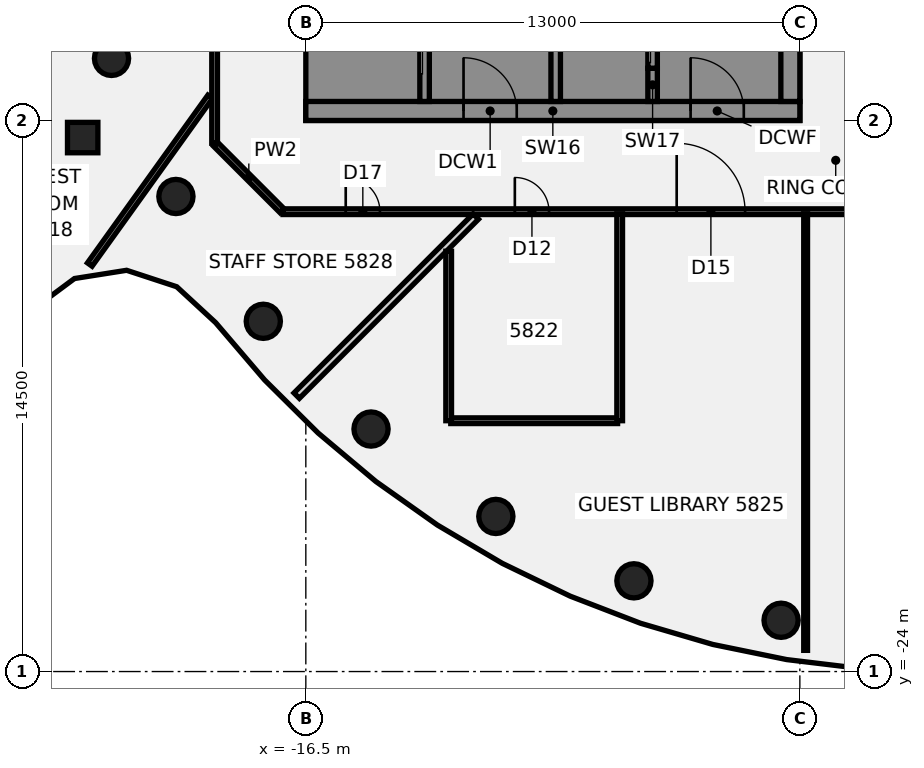
"""IFC4 building model, lengths in metres.
Left out: names, types, materials, properties, quantities, classifications, styles, units other than length and angle.
Written with IfcOpenShell. Run it as: python <this file> out.ifc"""

import sys

from ifc_helpers import new_model, si_unit, direction, frame, frame_2d, origin, origin_2d, place, context, subcontext, project, spatial, polyline, rectangle, circle, outline, extrude, element, fill, save


model = new_model("IFC4")
c1 = context("Model", 3, precision=1e-05, world=origin(), true_north=direction((0.0, 1.0)))
c2 = subcontext(c1, "Body", "Model", "MODEL_VIEW")
j1 = project(units=[si_unit("LENGTHUNIT", "METRE"), si_unit("PLANEANGLEUNIT", "RADIAN")], contexts=[c1])
p1 = place(None, origin())
s1 = spatial("IfcSite", under=j1, at=p1, CompositionType="ELEMENT")
p2 = place(p1, origin())
s2 = spatial("IfcBuilding", under=s1, at=p2, CompositionType="ELEMENT")
p3 = place(p2, frame((0.0, 0.0, 230.7)))
s3 = spatial("IfcBuildingStorey", under=s2, at=p3, CompositionType="ELEMENT", Elevation=230.7)
for number, where, z_axis, x_axis in (
    (1, (-21.613, -7.866, -0.14), (0.0, 0.0, 1.0), (1.0, 0.0, 0.0)),
    (2, (-19.919, -11.5, -0.14), (0.0, 0.0, 1.0), (1.0, 0.0, 0.0)),
    (3, (-17.619, -14.784, -0.14), (0.0, 0.0, 1.0), (1.0, 0.0, 0.0)),
    (4, (-14.784, -17.619, -0.14), (0.0, 0.0, 1.0), (1.0, 0.0, 0.0)),
    (5, (-11.5, -19.919, -0.14), (0.0, 0.0, 1.0), (1.0, 0.0, 0.0)),
    (6, (-7.866, -21.613, -0.14), (0.0, 0.0, 1.0), (1.0, 0.0, 0.0)),
    (7, (-3.994, -22.651, -0.14), (0.0, 0.0, 1.0), (1.0, 0.0, 0.0)),
):
    element("IfcColumn", number, at=place(p3, frame(where, z_axis=z_axis, x_axis=x_axis)), inside=s3, PredefinedType="COLUMN", context=c2, shape_type="SweptSolid", body=[
        extrude(circle(Radius=0.45, at=origin_2d()), origin(), (0.0, 0.0, 1.0), 3.6),
    ])
p4 = place(p3, frame((-22.372, -9.95, -0.139), z_axis=(0.050360127001, -0.001423368327, 0.998730109505), x_axis=(-0.811318568175, 0.583112220607, 0.041741096219)))
e8 = element("IfcColumn", 8, at=p4, inside=s3, PredefinedType="COLUMN", context=c2, shape_type="SweptSolid", body=[
    extrude(rectangle(XDim=0.8, YDim=0.8, at=origin_2d()), origin(), (0.0, 0.0, 1.0), 3.602),
])
p5 = place(p3, frame((-18.872, -10.128, 0.0), z_axis=(0.0, 0.0, 1.0), x_axis=(0.707106781187, -0.707106781187, 0.0)))
e9 = element("IfcWall", 9, at=p5, inside=s3, PredefinedType="PARTITIONING", context=c2, shape_type="SweptSolid", body=[
    extrude(rectangle(XDim=2.465, YDim=0.15, at=frame_2d((1.232, 0.0))), origin(), (0.0, 0.0, 1.0), 2.864),
])
p6 = place(p3, frame((-17.1, -11.9, 0.0), z_axis=(0.0, 0.0, 1.0), x_axis=(1.0, 0.0, 0.0)))
e10 = element("IfcWall", 10, at=p6, inside=s3, PredefinedType="PARTITIONING", context=c2, shape_type="SweptSolid", body=[
    extrude(rectangle(XDim=34.165, YDim=0.15, at=frame_2d((17.083, 0.0))), origin(), (0.0, 0.0, 1.0), 2.864),
])
p7 = place(p6, frame((6.1, 0.0, 0.0)))
e11 = element("IfcOpeningElement", 11, at=p7, cuts=e10, PredefinedType="OPENING", context=c2, shape_type="SweptSolid", body=[
    extrude(rectangle(XDim=0.9, YDim=2.1, at=frame_2d((0.45, 1.05))), frame((0.0, 0.085, 0.0), z_axis=(0.0, -1.0, 0.0), x_axis=(1.0, 0.0, 0.0)), (0.0, 0.0, 1.0), 0.17),
])
p8 = place(p6, frame((27.541, 0.0, 0.0)))
e12 = element("IfcOpeningElement", 12, at=p8, cuts=e10, PredefinedType="OPENING", context=c2, shape_type="SweptSolid", body=[
    extrude(rectangle(XDim=0.9, YDim=2.1, at=frame_2d((0.45, 1.05))), frame((0.0, 0.085, 0.0), z_axis=(0.0, -1.0, 0.0), x_axis=(1.0, 0.0, 0.0)), (0.0, 0.0, 1.0), 0.17),
])
p9 = place(p6, frame((19.152, 0.0, 0.0)))
e13 = element("IfcOpeningElement", 13, at=p9, cuts=e10, PredefinedType="OPENING", context=c2, shape_type="SweptSolid", body=[
    extrude(rectangle(XDim=1.8, YDim=2.1, at=frame_2d((0.9, 1.05))), frame((0.0, 0.085, 0.0), z_axis=(0.0, -1.0, 0.0), x_axis=(1.0, 0.0, 0.0)), (0.0, 0.0, 1.0), 0.17),
])
p10 = place(p6, frame((10.359, 0.0, 0.0)))
e14 = element("IfcOpeningElement", 14, at=p10, cuts=e10, PredefinedType="OPENING", context=c2, shape_type="SweptSolid", body=[
    extrude(rectangle(XDim=1.8, YDim=2.1, at=frame_2d((0.9, 1.05))), frame((0.0, 0.085, 0.0), z_axis=(0.0, -1.0, 0.0), x_axis=(1.0, 0.0, 0.0)), (0.0, 0.0, 1.0), 0.17),
])
p11 = place(p6, frame((30.5, 0.0, 0.0)))
e15 = element("IfcOpeningElement", 15, at=p11, cuts=e10, PredefinedType="OPENING", context=c2, shape_type="SweptSolid", body=[
    extrude(rectangle(XDim=0.9, YDim=2.1, at=frame_2d((0.45, 1.05))), frame((0.0, 0.085, 0.0), z_axis=(0.0, -1.0, 0.0), x_axis=(1.0, 0.0, 0.0)), (0.0, 0.0, 1.0), 0.17),
])
p12 = place(p6, frame((1.65, 0.0, 0.0)))
e16 = element("IfcOpeningElement", 16, at=p12, cuts=e10, PredefinedType="OPENING", context=c2, shape_type="SweptSolid", body=[
    extrude(rectangle(XDim=0.9, YDim=2.1, at=frame_2d((0.45, 1.05))), frame((0.0, 0.085, 0.0), z_axis=(0.0, -1.0, 0.0), x_axis=(1.0, 0.0, 0.0)), (0.0, 0.0, 1.0), 0.17),
])
p13 = place(p3, frame((-12.686, -17.4, 0.0), z_axis=(0.0, 0.0, 1.0), x_axis=(1.0, 0.0, 0.0)))
e17 = element("IfcWall", 17, at=p13, inside=s3, PredefinedType="PARTITIONING", context=c2, shape_type="SweptSolid", body=[
    extrude(rectangle(XDim=4.39, YDim=0.15, at=frame_2d((2.195, 0.0))), origin(), (0.0, 0.0, 1.0), 2.864),
])
p14 = place(p3, frame((-16.74, -16.74, 0.0), z_axis=(0.0, 0.0, 1.0), x_axis=(0.707106781187, 0.707106781187, 0.0)))
e18 = element("IfcWall", 18, at=p14, inside=s3, PredefinedType="PARTITIONING", context=c2, shape_type="SweptSolid", body=[
    extrude(rectangle(XDim=6.665, YDim=0.2, at=frame_2d((3.333, 0.0))), origin(), (0.0, 0.0, 1.0), 2.864),
])
p15 = place(p3, frame((-22.185, -13.291, 0.0), z_axis=(0.0, 0.0, 1.0), x_axis=(0.583119360329, 0.812386491523, 0.0)))
e19 = element("IfcWall", 19, at=p15, inside=s3, PredefinedType="PARTITIONING", context=c2, shape_type="SweptSolid", body=[
    extrude(rectangle(XDim=5.434, YDim=0.15, at=frame_2d((2.717, 0.0))), origin(), (0.0, 0.0, 1.0), 2.864),
])
p16 = place(p3, frame((-18.9, -10.1, 0.0), z_axis=(0.0, 0.0, 1.0), x_axis=(0.0, 1.0, 0.0)))
e20 = element("IfcWall", 20, at=p16, inside=s3, PredefinedType="PARTITIONING", context=c2, shape_type="SweptSolid", body=[
    extrude(rectangle(XDim=20.2, YDim=0.15, at=frame_2d((10.1, 0.0))), origin(), (0.0, 0.0, 1.0), 2.864),
])
p17 = place(p16, frame((13.775, 0.0, 0.0)))
e21 = element("IfcOpeningElement", 21, at=p17, cuts=e20, PredefinedType="OPENING", context=c2, shape_type="SweptSolid", body=[
    extrude(rectangle(XDim=1.8, YDim=2.1, at=frame_2d((0.9, 1.05))), frame((0.0, 0.085, 0.0), z_axis=(0.0, -1.0, 0.0), x_axis=(1.0, 0.0, 0.0)), (0.0, 0.0, 1.0), 0.17),
])
p18 = place(p16, frame((5.597, 0.0, 0.0)))
e22 = element("IfcOpeningElement", 22, at=p18, cuts=e20, PredefinedType="OPENING", context=c2, shape_type="SweptSolid", body=[
    extrude(rectangle(XDim=1.8, YDim=2.1, at=frame_2d((0.9, 1.05))), frame((0.0, 0.085, 0.0), z_axis=(0.0, -1.0, 0.0), x_axis=(1.0, 0.0, 0.0)), (0.0, 0.0, 1.0), 0.17),
])
p19 = place(p3, frame((-12.741, -17.4, 0.0), z_axis=(0.0, 0.0, 1.0), x_axis=(0.0, 1.0, 0.0)))
e23 = element("IfcWall", 23, at=p19, inside=s3, PredefinedType="PARTITIONING", context=c2, shape_type="SweptSolid", body=[
    extrude(rectangle(XDim=4.459, YDim=0.15, at=frame_2d((2.229, 0.0))), origin(), (0.0, 0.0, 1.0), 2.864),
])
p20 = place(p3, frame((-8.241, -17.4, 0.0), z_axis=(0.0, 0.0, 1.0), x_axis=(0.0, 1.0, 0.0)))
e24 = element("IfcWall", 24, at=p20, inside=s3, PredefinedType="PARTITIONING", context=c2, shape_type="SweptSolid", body=[
    extrude(rectangle(XDim=5.445, YDim=0.15, at=frame_2d((2.722, 0.0))), origin(), (0.0, 0.0, 1.0), 2.864),
])
p21 = place(p3, frame((-3.348, -23.442, 0.0), z_axis=(0.0, 0.0, 1.0), x_axis=(0.0, 1.0, 0.0)))
e25 = element("IfcWall", 25, at=p21, inside=s3, PredefinedType="PARTITIONING", context=c2, shape_type="SweptSolid", body=[
    extrude(rectangle(XDim=11.487, YDim=0.1, at=frame_2d((5.744, 0.0))), origin(), (0.0, 0.0, 1.0), 2.864),
])
p22 = place(p3, frame((-16.5, -9.25, 0.0), z_axis=(0.0, 0.0, 1.0), x_axis=(1.0, 0.0, 0.0)))
e26 = element("IfcWall", 26, at=p22, inside=s3, PredefinedType="SHEAR", context=c2, shape_type="SweptSolid", body=[
    extrude(rectangle(XDim=13.0, YDim=0.5, at=frame_2d((6.5, 0.0))), origin(), (0.0, 0.0, 1.0), 3.46),
])
p23 = place(p22, frame((4.15, 0.0, 0.0)))
e27 = element("IfcOpeningElement", 27, at=p23, cuts=e26, PredefinedType="OPENING", context=c2, shape_type="SweptSolid", body=[
    extrude(rectangle(XDim=1.4, YDim=2.1, at=frame_2d((0.7, 1.05))), frame((0.0, 0.26, 0.0), z_axis=(0.0, -1.0, 0.0), x_axis=(1.0, 0.0, 0.0)), (0.0, 0.0, 1.0), 0.52),
])
p24 = place(p22, frame((10.125, 0.0, 0.0)))
e28 = element("IfcOpeningElement", 28, at=p24, cuts=e26, PredefinedType="OPENING", context=c2, shape_type="SweptSolid", body=[
    extrude(rectangle(XDim=1.4, YDim=2.1, at=frame_2d((0.7, 1.05))), frame((0.0, 0.26, 0.0), z_axis=(0.0, -1.0, 0.0), x_axis=(1.0, 0.0, 0.0)), (0.0, 0.0, 1.0), 0.52),
])
p25 = place(p3, origin())
e29 = element("IfcWall", 29, at=p25, inside=s3, PredefinedType="SHEAR", context=c2, shape_type="SweptSolid", body=[
    extrude(outline(polyline([(-13.5, -8.125), (-16.0, -8.125), (-16.0, -5.625), (-13.5, -5.625), (-13.5, -5.375), (-16.0, -5.375), (-16.0, 5.375), (-13.5, 5.375), (-13.5, 5.625), (-16.0, 5.625), (-16.0, 8.125), (-13.5, 8.125), (-13.5, 9.0), (-16.0, 9.0), (-16.5, 9.0), (-16.5, -9.0), (-16.0, -9.0), (-13.5, -9.0), (-13.5, -8.125)])), origin(), (0.0, 0.0, 1.0), 3.46),
])
p26 = place(p3, origin())
e30 = element("IfcWall", 30, at=p26, inside=s3, PredefinedType="SHEAR", context=c2, shape_type="SweptSolid", body=[
    extrude(outline(polyline([(-7.5, -8.125), (-9.55, -8.125), (-9.55, -5.625), (-9.8, -5.625), (-9.8, -8.125), (-9.8, -9.0), (-7.5, -9.0), (-7.5, -8.125)])), origin(), (0.0, 0.0, 1.0), 3.46),
])
p27 = place(p3, frame((-7.375, -9.0, 0.0), z_axis=(0.0, 0.0, 1.0), x_axis=(0.0, 1.0, 0.0)))
e31 = element("IfcWall", 31, at=p27, inside=s3, PredefinedType="SHEAR", context=c2, shape_type="SweptSolid", body=[
    extrude(rectangle(XDim=0.875, YDim=0.25, at=frame_2d((0.438, 0.0))), origin(), (0.0, 0.0, 1.0), 3.46),
])
p28 = place(p3, frame((-13.375, -9.0, 0.0), z_axis=(0.0, 0.0, 1.0), x_axis=(0.0, 1.0, 0.0)))
e32 = element("IfcWall", 32, at=p28, inside=s3, PredefinedType="SHEAR", context=c2, shape_type="SweptSolid", body=[
    extrude(rectangle(XDim=18.0, YDim=0.25, at=frame_2d((9.0, 0.0))), origin(), (0.0, 0.0, 1.0), 3.46),
])
p29 = place(p28, frame((1.425, 0.0, 0.0)))
e33 = element("IfcOpeningElement", 33, at=p29, cuts=e32, PredefinedType="OPENING", context=c2, shape_type="SweptSolid", body=[
    extrude(rectangle(XDim=1.4, YDim=2.1, at=frame_2d((0.7, 1.05))), frame((0.0, 0.135, 0.0), z_axis=(0.0, -1.0, 0.0), x_axis=(1.0, 0.0, 0.0)), (0.0, 0.0, 1.0), 0.27),
])
p30 = place(p28, frame((8.5, 0.0, 0.0)))
e34 = element("IfcOpeningElement", 34, at=p30, cuts=e32, PredefinedType="OPENING", context=c2, shape_type="SweptSolid", body=[
    extrude(rectangle(XDim=1.0, YDim=2.1, at=frame_2d((0.5, 1.05))), frame((0.0, 0.135, 0.0), z_axis=(0.0, -1.0, 0.0), x_axis=(1.0, 0.0, 0.0)), (0.0, 0.0, 1.0), 0.27),
])
p31 = place(p3, frame((-9.925, -9.0, 0.0), z_axis=(0.0, 0.0, 1.0), x_axis=(0.0, 1.0, 0.0)))
e35 = element("IfcWall", 35, at=p31, inside=s3, PredefinedType="SHEAR", context=c2, shape_type="SweptSolid", body=[
    extrude(rectangle(XDim=18.0, YDim=0.25, at=frame_2d((9.0, 0.0))), origin(), (0.0, 0.0, 1.0), 3.46),
])
p32 = place(p31, frame((12.575, 0.0, 0.0)))
e36 = element("IfcOpeningElement", 36, at=p32, cuts=e35, PredefinedType="OPENING", context=c2, shape_type="SweptSolid", body=[
    extrude(rectangle(XDim=1.1, YDim=2.1, at=frame_2d((0.55, 1.05))), frame((0.0, 0.135, 0.0), z_axis=(0.0, -1.0, 0.0), x_axis=(1.0, 0.0, 0.0)), (0.0, 0.0, 1.0), 0.27),
])
p33 = place(p31, frame((15.325, 0.0, 0.0)))
e37 = element("IfcOpeningElement", 37, at=p33, cuts=e35, PredefinedType="OPENING", context=c2, shape_type="SweptSolid", body=[
    extrude(rectangle(XDim=1.1, YDim=2.1, at=frame_2d((0.55, 1.05))), frame((0.0, 0.135, 0.0), z_axis=(0.0, -1.0, 0.0), x_axis=(1.0, 0.0, 0.0)), (0.0, 0.0, 1.0), 0.27),
])
p34 = place(p31, frame((5.75, 0.0, 0.0)))
e38 = element("IfcOpeningElement", 38, at=p34, cuts=e35, PredefinedType="OPENING", context=c2, shape_type="SweptSolid", body=[
    extrude(rectangle(XDim=1.0, YDim=2.1, at=frame_2d((0.5, 1.05))), frame((0.0, 0.135, 0.0), z_axis=(0.0, -1.0, 0.0), x_axis=(1.0, 0.0, 0.0)), (0.0, 0.0, 1.0), 0.27),
])
p35 = place(p31, frame((9.396, 0.0, 0.0)))
e39 = element("IfcOpeningElement", 39, at=p35, cuts=e35, PredefinedType="OPENING", context=c2, shape_type="SweptSolid", body=[
    extrude(rectangle(XDim=1.0, YDim=2.1, at=frame_2d((0.5, 1.05))), frame((0.0, 0.135, 0.0), z_axis=(0.0, -1.0, 0.0), x_axis=(1.0, 0.0, 0.0)), (0.0, 0.0, 1.0), 0.27),
])
p36 = place(p31, frame((10.771, 0.0, 0.0)))
e40 = element("IfcOpeningElement", 40, at=p36, cuts=e35, PredefinedType="OPENING", context=c2, shape_type="SweptSolid", body=[
    extrude(rectangle(XDim=1.0, YDim=2.1, at=frame_2d((0.5, 1.05))), frame((0.0, 0.135, 0.0), z_axis=(0.0, -1.0, 0.0), x_axis=(1.0, 0.0, 0.0)), (0.0, 0.0, 1.0), 0.27),
])
p37 = place(p3, frame((-7.375, -8.125, 0.0), z_axis=(0.0, 0.0, 1.0), x_axis=(0.0, 1.0, 0.0)))
e41 = element("IfcWall", 41, at=p37, inside=s3, PredefinedType="SHEAR", context=c2, shape_type="SweptSolid", body=[
    extrude(rectangle(XDim=2.5, YDim=0.25, at=frame_2d((1.25, 0.0))), origin(), (0.0, 0.0, 1.0), 3.46),
])
p38 = place(p37, frame((0.7, 0.0, 0.0)))
e42 = element("IfcOpeningElement", 42, at=p38, cuts=e41, PredefinedType="OPENING", context=c2, shape_type="SweptSolid", body=[
    extrude(rectangle(XDim=1.1, YDim=2.1, at=frame_2d((0.55, 1.05))), frame((0.0, 0.135, 0.0), z_axis=(0.0, -1.0, 0.0), x_axis=(1.0, 0.0, 0.0)), (0.0, 0.0, 1.0), 0.27),
])
p39 = place(p3, frame((-3.75, -9.0, 0.0), z_axis=(0.0, 0.0, 1.0), x_axis=(0.0, 1.0, 0.0)))
e43 = element("IfcWall", 43, at=p39, inside=s3, PredefinedType="SHEAR", context=c2, shape_type="SweptSolid", body=[
    extrude(rectangle(XDim=18.0, YDim=0.5, at=frame_2d((9.0, 0.0))), origin(), (0.0, 0.0, 1.0), 3.46),
])
p40 = place(p39, frame((1.35, 0.0, 0.0)))
e44 = element("IfcOpeningElement", 44, at=p40, cuts=e43, PredefinedType="OPENING", context=c2, shape_type="SweptSolid", body=[
    extrude(rectangle(XDim=1.8, YDim=2.1, at=frame_2d((0.9, 1.05))), frame((0.0, 0.26, 0.0), z_axis=(0.0, -1.0, 0.0), x_axis=(1.0, 0.0, 0.0)), (0.0, 0.0, 1.0), 0.52),
])
p41 = place(p39, frame((12.478, 0.0, 0.0)))
e45 = element("IfcOpeningElement", 45, at=p41, cuts=e43, PredefinedType="OPENING", context=c2, shape_type="SweptSolid", body=[
    extrude(rectangle(XDim=1.0, YDim=2.1, at=frame_2d((0.5, 1.05))), frame((0.0, 0.26, 0.0), z_axis=(0.0, -1.0, 0.0), x_axis=(1.0, 0.0, 0.0)), (0.0, 0.0, 1.0), 0.52),
])
p42 = place(p39, frame((16.002, 0.0, 0.0)))
e46 = element("IfcOpeningElement", 46, at=p42, cuts=e43, PredefinedType="OPENING", context=c2, shape_type="SweptSolid", body=[
    extrude(rectangle(XDim=1.0, YDim=2.1, at=frame_2d((0.5, 1.05))), frame((0.0, 0.26, 0.0), z_axis=(0.0, -1.0, 0.0), x_axis=(1.0, 0.0, 0.0)), (0.0, 0.0, 1.0), 0.52),
])
p43 = place(p7, frame((0.9, 0.0, 0.0), z_axis=(0.0, 0.0, 1.0), x_axis=(-1.0, 0.0, 0.0)))
e47 = element("IfcDoor", 47, at=p43, inside=s3, OperationType="SINGLE_SWING_LEFT", PredefinedType="DOOR", context=c2, shape_type="SweptSolid", body=[
    extrude(rectangle(XDim=0.9, YDim=2.1, at=frame_2d((0.45, 1.05))), frame((0.0, 0.025, 0.0), z_axis=(0.0, -1.0, 0.0), x_axis=(1.0, 0.0, 0.0)), (0.0, 0.0, 1.0), 0.05),
])
fill(e11, e47)
p44 = place(p10, frame((1.8, 0.0, 0.0), z_axis=(0.0, 0.0, 1.0), x_axis=(-1.0, 0.0, 0.0)))
e48 = element("IfcDoor", 48, at=p44, inside=s3, OperationType="DOUBLE_DOOR_SINGLE_SWING", PredefinedType="DOOR", context=c2, shape_type="SweptSolid", body=[
    extrude(rectangle(XDim=1.8, YDim=2.1, at=frame_2d((0.9, 1.05))), frame((0.0, 0.025, 0.0), z_axis=(0.0, -1.0, 0.0), x_axis=(1.0, 0.0, 0.0)), (0.0, 0.0, 1.0), 0.05),
])
fill(e14, e48)
p45 = place(p12, frame((0.9, 0.0, 0.0), z_axis=(0.0, 0.0, 1.0), x_axis=(-1.0, 0.0, 0.0)))
e49 = element("IfcDoor", 49, at=p45, inside=s3, OperationType="SINGLE_SWING_LEFT", PredefinedType="DOOR", context=c2, shape_type="SweptSolid", body=[
    extrude(rectangle(XDim=0.9, YDim=2.1, at=frame_2d((0.45, 1.05))), frame((0.0, 0.025, 0.0), z_axis=(0.0, -1.0, 0.0), x_axis=(1.0, 0.0, 0.0)), (0.0, 0.0, 1.0), 0.05),
])
fill(e16, e49)
p46 = place(p23, origin())
e50 = element("IfcDoor", 50, at=p46, inside=s3, OperationType="SINGLE_SWING_LEFT", PredefinedType="DOOR", context=c2, shape_type="SweptSolid", body=[
    extrude(rectangle(XDim=1.4, YDim=2.1, at=frame_2d((0.7, 1.05))), frame((0.0, 0.025, 0.0), z_axis=(0.0, -1.0, 0.0), x_axis=(1.0, 0.0, 0.0)), (0.0, 0.0, 1.0), 0.05),
])
fill(e27, e50)
p47 = place(p24, origin())
e51 = element("IfcDoor", 51, at=p47, inside=s3, OperationType="SINGLE_SWING_LEFT", PredefinedType="DOOR", context=c2, shape_type="SweptSolid", body=[
    extrude(rectangle(XDim=1.4, YDim=2.1, at=frame_2d((0.7, 1.05))), frame((0.0, 0.025, 0.0), z_axis=(0.0, -1.0, 0.0), x_axis=(1.0, 0.0, 0.0)), (0.0, 0.0, 1.0), 0.05),
])
fill(e28, e51)
save(model, sys.argv[1])
